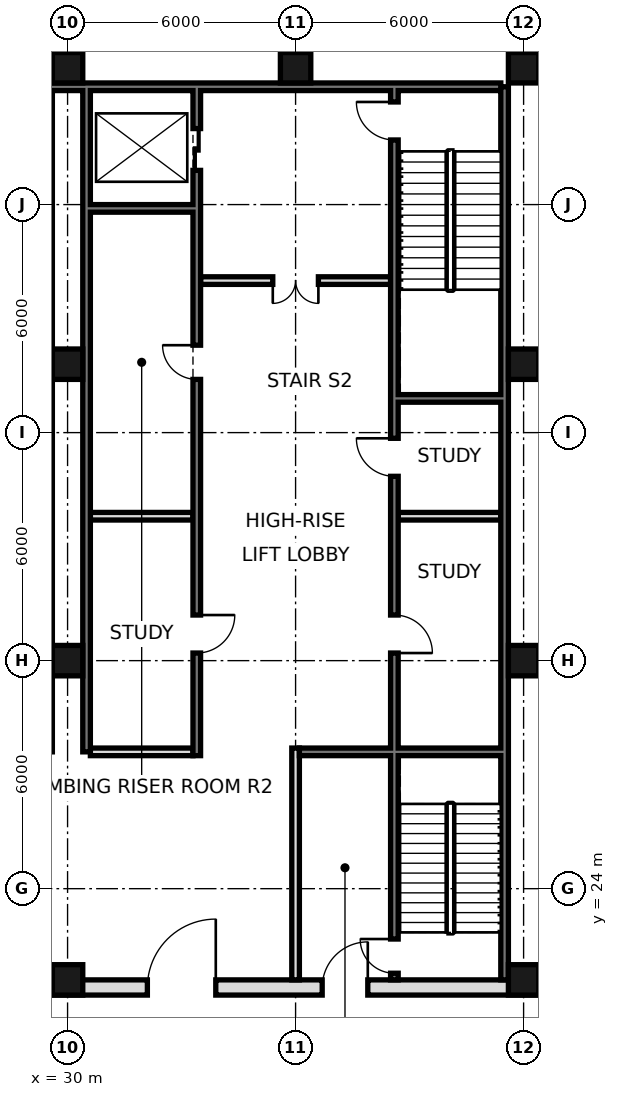
"""IFC4 building model, lengths in metres.
Left out: names, types, materials, properties, quantities, classifications, styles, units other than length and angle.
Written with IfcOpenShell. Run it as: python <this file> out.ifc"""

import sys

from ifc_helpers import new_model, si_unit, direction, frame, frame_2d, origin, origin_2d, place, context, subcontext, project, spatial, rectangle, hollow_rectangle, extrude, element, fill, save


model = new_model("IFC4")
c1 = context("Model", 3, precision=1e-05, world=origin(), true_north=direction((0.0, 1.0)))
c2 = subcontext(c1, "Body", "Model", "MODEL_VIEW")
j1 = project(units=[si_unit("LENGTHUNIT", "METRE"), si_unit("PLANEANGLEUNIT", "RADIAN")], contexts=[c1])
p1 = place(None, origin())
s1 = spatial("IfcSite", under=j1, at=p1, CompositionType="ELEMENT")
p2 = place(p1, origin())
s2 = spatial("IfcBuilding", under=s1, at=p2, CompositionType="ELEMENT")
p3 = place(p2, frame((0.0, 0.0, 34.8)))
s3 = spatial("IfcBuildingStorey", under=s2, at=p3, CompositionType="ELEMENT", Elevation=34.8)
for number, where, z_axis, x_axis in (
    (1, (30.0, 21.6, 0.0), (0.0, 0.0, 1.0), (1.0, 0.0, 0.0)),
    (2, (30.0, 30.0, 0.0), (0.0, 0.0, 1.0), (1.0, 0.0, 0.0)),
    (3, (30.0, 37.8, 0.0), (0.0, 0.0, 1.0), (1.0, 0.0, 0.0)),
    (4, (30.0, 45.6, 0.0), (0.0, 0.0, 1.0), (1.0, 0.0, 0.0)),
    (5, (36.0, 45.6, 0.0), (0.0, 0.0, 1.0), (1.0, 0.0, 0.0)),
    (6, (42.0, 21.6, 0.0), (0.0, 0.0, 1.0), (1.0, 0.0, 0.0)),
    (7, (42.0, 30.0, 0.0), (0.0, 0.0, 1.0), (1.0, 0.0, 0.0)),
    (8, (42.0, 37.8, 0.0), (0.0, 0.0, 1.0), (1.0, 0.0, 0.0)),
    (9, (42.0, 45.6, 0.0), (0.0, 0.0, 1.0), (1.0, 0.0, 0.0)),
):
    element("IfcColumn", number, at=place(p3, frame(where, z_axis=z_axis, x_axis=x_axis)), inside=s3, PredefinedType="COLUMN", context=c2, shape_type="SweptSolid", body=[
        extrude(hollow_rectangle(XDim=0.8, YDim=0.8, WallThickness=0.07, at=origin_2d()), origin(), (0.0, 0.0, 1.0), 4.8),
    ])
p4 = place(p3, frame((41.5, 21.6, 0.0), z_axis=(0.0, 0.0, 1.0), x_axis=(0.0, 1.0, 0.0)))
e10 = element("IfcWall", 10, at=p4, inside=s3, PredefinedType="SOLIDWALL", context=c2, shape_type="SweptSolid", body=[
    extrude(rectangle(XDim=23.5, YDim=0.2, at=frame_2d((11.75, 0.0))), origin(), (0.0, 0.0, 1.0), 4.4),
])
p5 = place(p3, frame((6.6, 45.1, 0.0), z_axis=(0.0, 0.0, 1.0), x_axis=(1.0, 0.0, 0.0)))
e11 = element("IfcWall", 11, at=p5, inside=s3, PredefinedType="SOLIDWALL", context=c2, shape_type="SweptSolid", body=[
    extrude(rectangle(XDim=34.8, YDim=0.2, at=frame_2d((17.4, 0.0))), origin(), (0.0, 0.0, 1.0), 4.4),
])
p6 = place(p3, frame((30.5, 27.6, 0.0), z_axis=(0.0, 0.0, 1.0), x_axis=(0.0, 1.0, 0.0)))
e12 = element("IfcWall", 12, at=p6, inside=s3, PredefinedType="SOLIDWALL", context=c2, shape_type="SweptSolid", body=[
    extrude(rectangle(XDim=17.5, YDim=0.2, at=frame_2d((8.75, 0.0))), origin(), (0.0, 0.0, 1.0), 4.4),
])
p7 = place(p3, frame((5.6, 21.4, 0.0), z_axis=(0.0, 0.0, 1.0), x_axis=(1.0, 0.0, 0.0)))
e13 = element("IfcWall", 13, at=p7, inside=s3, PredefinedType="SOLIDWALL", context=c2, shape_type="SweptSolid", body=[
    extrude(rectangle(XDim=36.8, YDim=0.4, at=frame_2d((18.4, 0.0))), origin(), (0.0, 0.0, 1.0), 4.4),
])
p8 = place(p7, frame((8.5, 0.0, 0.0)))
e14 = element("IfcOpeningElement", 14, at=p8, cuts=e13, PredefinedType="OPENING", context=c2, shape_type="SweptSolid", body=[
    extrude(rectangle(XDim=1.8, YDim=2.1, at=frame_2d((0.9, 1.05))), frame((0.0, 0.21, 0.0), z_axis=(0.0, -1.0, 0.0), x_axis=(1.0, 0.0, 0.0)), (0.0, 0.0, 1.0), 0.42),
])
p9 = place(p7, frame((17.5, 0.0, 0.0)))
e15 = element("IfcOpeningElement", 15, at=p9, cuts=e13, PredefinedType="OPENING", context=c2, shape_type="SweptSolid", body=[
    extrude(rectangle(XDim=1.8, YDim=2.1, at=frame_2d((0.9, 1.05))), frame((0.0, 0.21, 0.0), z_axis=(0.0, -1.0, 0.0), x_axis=(1.0, 0.0, 0.0)), (0.0, 0.0, 1.0), 0.42),
])
p10 = place(p7, frame((26.5, 0.0, 0.0)))
e16 = element("IfcOpeningElement", 16, at=p10, cuts=e13, PredefinedType="OPENING", context=c2, shape_type="SweptSolid", body=[
    extrude(rectangle(XDim=1.8, YDim=2.1, at=frame_2d((0.9, 1.05))), frame((0.0, 0.21, 0.0), z_axis=(0.0, -1.0, 0.0), x_axis=(1.0, 0.0, 0.0)), (0.0, 0.0, 1.0), 0.42),
])
p11 = place(p7, frame((4.5, 0.0, 0.0)))
e17 = element("IfcOpeningElement", 17, at=p11, cuts=e13, PredefinedType="OPENING", context=c2, shape_type="SweptSolid", body=[
    extrude(rectangle(XDim=1.2, YDim=2.1, at=frame_2d((0.6, 1.05))), frame((0.0, 0.21, 0.0), z_axis=(0.0, -1.0, 0.0), x_axis=(1.0, 0.0, 0.0)), (0.0, 0.0, 1.0), 0.42),
])
p12 = place(p7, frame((31.1, 0.0, 0.0)))
e18 = element("IfcOpeningElement", 18, at=p12, cuts=e13, PredefinedType="OPENING", context=c2, shape_type="SweptSolid", body=[
    extrude(rectangle(XDim=1.2, YDim=2.1, at=frame_2d((0.6, 1.05))), frame((0.0, 0.21, 0.0), z_axis=(0.0, -1.0, 0.0), x_axis=(1.0, 0.0, 0.0)), (0.0, 0.0, 1.0), 0.42),
])
p13 = place(p3, frame((33.4, 27.5, 0.0), z_axis=(0.0, 0.0, 1.0), x_axis=(0.0, 1.0, 0.0)))
e19 = element("IfcWall", 19, at=p13, inside=s3, PredefinedType="SOLIDWALL", context=c2, shape_type="SweptSolid", body=[
    extrude(rectangle(XDim=17.5, YDim=0.2, at=frame_2d((8.75, 0.0))), origin(), (0.0, 0.0, 1.0), 4.4),
])
p14 = place(p13, frame((15.4, 0.0, 0.0)))
e20 = element("IfcOpeningElement", 20, at=p14, cuts=e19, PredefinedType="OPENING", context=c2, shape_type="SweptSolid", body=[
    extrude(rectangle(XDim=1.1, YDim=2.1, at=frame_2d((0.55, 1.05))), frame((0.0, 0.11, 0.0), z_axis=(0.0, -1.0, 0.0), x_axis=(1.0, 0.0, 0.0)), (0.0, 0.0, 1.0), 0.22),
])
p15 = place(p13, frame((2.7, 0.0, 0.0)))
e21 = element("IfcOpeningElement", 21, at=p15, cuts=e19, PredefinedType="OPENING", context=c2, shape_type="SweptSolid", body=[
    extrude(rectangle(XDim=1.0, YDim=2.1, at=frame_2d((0.5, 1.05))), frame((0.0, 0.11, 0.0), z_axis=(0.0, -1.0, 0.0), x_axis=(1.0, 0.0, 0.0)), (0.0, 0.0, 1.0), 0.22),
])
p16 = place(p13, frame((9.9, 0.0, 0.0)))
e22 = element("IfcOpeningElement", 22, at=p16, cuts=e19, PredefinedType="OPENING", context=c2, shape_type="SweptSolid", body=[
    extrude(rectangle(XDim=0.9, YDim=2.1, at=frame_2d((0.45, 1.05))), frame((0.0, 0.11, 0.0), z_axis=(0.0, -1.0, 0.0), x_axis=(1.0, 0.0, 0.0)), (0.0, 0.0, 1.0), 0.22),
])
p17 = place(p3, frame((36.0, 21.6, 0.0), z_axis=(0.0, 0.0, 1.0), x_axis=(0.0, 1.0, 0.0)))
e23 = element("IfcWall", 23, at=p17, inside=s3, PredefinedType="PARTITIONING", context=c2, shape_type="SweptSolid", body=[
    extrude(rectangle(XDim=6.1, YDim=0.2, at=frame_2d((3.05, 0.0))), origin(), (0.0, 0.0, 1.0), 4.4),
])
p18 = place(p3, frame((38.6, 21.6, 0.0), z_axis=(0.0, 0.0, 1.0), x_axis=(0.0, 1.0, 0.0)))
e24 = element("IfcWall", 24, at=p18, inside=s3, PredefinedType="SOLIDWALL", context=c2, shape_type="SweptSolid", body=[
    extrude(rectangle(XDim=23.4, YDim=0.2, at=frame_2d((11.7, 0.0))), origin(), (0.0, 0.0, 1.0), 4.4),
])
p19 = place(p18, frame((8.6, 0.0, 0.0)))
e25 = element("IfcOpeningElement", 25, at=p19, cuts=e24, PredefinedType="OPENING", context=c2, shape_type="SweptSolid", body=[
    extrude(rectangle(XDim=1.0, YDim=2.1, at=frame_2d((0.5, 1.05))), frame((0.0, 0.11, 0.0), z_axis=(0.0, -1.0, 0.0), x_axis=(1.0, 0.0, 0.0)), (0.0, 0.0, 1.0), 0.22),
])
p20 = place(p18, frame((13.25, 0.0, 0.0)))
e26 = element("IfcOpeningElement", 26, at=p20, cuts=e24, PredefinedType="OPENING", context=c2, shape_type="SweptSolid", body=[
    extrude(rectangle(XDim=1.0, YDim=2.1, at=frame_2d((0.5, 1.05))), frame((0.0, 0.11, 0.0), z_axis=(0.0, -1.0, 0.0), x_axis=(1.0, 0.0, 0.0)), (0.0, 0.0, 1.0), 0.22),
])
p21 = place(p18, frame((22.1, 0.0, 0.0)))
e27 = element("IfcOpeningElement", 27, at=p21, cuts=e24, PredefinedType="OPENING", context=c2, shape_type="SweptSolid", body=[
    extrude(rectangle(XDim=1.0, YDim=2.1, at=frame_2d((0.5, 1.05))), frame((0.0, 0.11, 0.0), z_axis=(0.0, -1.0, 0.0), x_axis=(1.0, 0.0, 0.0)), (0.0, 0.0, 1.0), 0.22),
])
p22 = place(p18, frame((0.175, 0.0, 0.0)))
e28 = element("IfcOpeningElement", 28, at=p22, cuts=e24, PredefinedType="OPENING", context=c2, shape_type="SweptSolid", body=[
    extrude(rectangle(XDim=0.9, YDim=2.1, at=frame_2d((0.45, 1.05))), frame((0.0, 0.11, 0.0), z_axis=(0.0, -1.0, 0.0), x_axis=(1.0, 0.0, 0.0)), (0.0, 0.0, 1.0), 0.22),
])
p23 = place(p3, frame((30.6, 27.6, 0.0), z_axis=(0.0, 0.0, 1.0), x_axis=(1.0, 0.0, 0.0)))
e29 = element("IfcWall", 29, at=p23, inside=s3, PredefinedType="PARTITIONING", context=c2, shape_type="SweptSolid", body=[
    extrude(rectangle(XDim=2.7, YDim=0.2, at=frame_2d((1.35, 0.0))), origin(), (0.0, 0.0, 1.0), 4.4),
])
p24 = place(p3, frame((36.1, 27.6, 0.0), z_axis=(0.0, 0.0, 1.0), x_axis=(1.0, 0.0, 0.0)))
e30 = element("IfcWall", 30, at=p24, inside=s3, PredefinedType="SOLIDWALL", context=c2, shape_type="SweptSolid", body=[
    extrude(rectangle(XDim=5.3, YDim=0.2, at=frame_2d((2.65, 0.0))), origin(), (0.0, 0.0, 1.0), 4.4),
])
p25 = place(p3, frame((30.6, 33.8, 0.0), z_axis=(0.0, 0.0, 1.0), x_axis=(1.0, 0.0, 0.0)))
e31 = element("IfcWall", 31, at=p25, inside=s3, PredefinedType="SOLIDWALL", context=c2, shape_type="SweptSolid", body=[
    extrude(rectangle(XDim=2.7, YDim=0.2, at=frame_2d((1.35, 0.0))), origin(), (0.0, 0.0, 1.0), 4.4),
])
p26 = place(p3, frame((38.7, 33.8, 0.0), z_axis=(0.0, 0.0, 1.0), x_axis=(1.0, 0.0, 0.0)))
e32 = element("IfcWall", 32, at=p26, inside=s3, PredefinedType="PARTITIONING", context=c2, shape_type="SweptSolid", body=[
    extrude(rectangle(XDim=2.7, YDim=0.2, at=frame_2d((1.35, 0.0))), origin(), (0.0, 0.0, 1.0), 4.4),
])
p27 = place(p3, frame((38.7, 36.9, 0.0), z_axis=(0.0, 0.0, 1.0), x_axis=(1.0, 0.0, 0.0)))
e33 = element("IfcWall", 33, at=p27, inside=s3, PredefinedType="SOLIDWALL", context=c2, shape_type="SweptSolid", body=[
    extrude(rectangle(XDim=2.7, YDim=0.2, at=frame_2d((1.35, 0.0))), origin(), (0.0, 0.0, 1.0), 4.4),
])
p28 = place(p3, frame((33.5, 40.0, 0.0), z_axis=(0.0, 0.0, 1.0), x_axis=(1.0, 0.0, 0.0)))
e34 = element("IfcWall", 34, at=p28, inside=s3, PredefinedType="PARTITIONING", context=c2, shape_type="SweptSolid", body=[
    extrude(rectangle(XDim=5.0, YDim=0.2, at=frame_2d((2.5, 0.0))), origin(), (0.0, 0.0, 1.0), 4.4),
])
p29 = place(p28, frame((1.9, 0.0, 0.0)))
e35 = element("IfcOpeningElement", 35, at=p29, cuts=e34, PredefinedType="OPENING", context=c2, shape_type="SweptSolid", body=[
    extrude(rectangle(XDim=1.2, YDim=2.1, at=frame_2d((0.6, 1.05))), frame((0.0, 0.11, 0.0), z_axis=(0.0, -1.0, 0.0), x_axis=(1.0, 0.0, 0.0)), (0.0, 0.0, 1.0), 0.22),
])
p30 = place(p3, frame((30.6, 41.9, 0.0), z_axis=(0.0, 0.0, 1.0), x_axis=(1.0, 0.0, 0.0)))
e36 = element("IfcWall", 36, at=p30, inside=s3, PredefinedType="SOLIDWALL", context=c2, shape_type="SweptSolid", body=[
    extrude(rectangle(XDim=2.7, YDim=0.2, at=frame_2d((1.35, 0.0))), origin(), (0.0, 0.0, 1.0), 4.4),
])
p31 = place(p10, frame((1.8, 0.0, 0.0), z_axis=(0.0, 0.0, 1.0), x_axis=(-1.0, 0.0, 0.0)))
e37 = element("IfcDoor", 37, at=p31, inside=s3, OperationType="SINGLE_SWING_LEFT", PredefinedType="DOOR", context=c2, shape_type="SweptSolid", body=[
    extrude(rectangle(XDim=1.8, YDim=2.1, at=frame_2d((0.9, 1.05))), frame((0.0, 0.025, 0.0), z_axis=(0.0, -1.0, 0.0), x_axis=(1.0, 0.0, 0.0)), (0.0, 0.0, 1.0), 0.05),
])
fill(e16, e37)
p32 = place(p12, frame((1.2, 0.0, 0.0), z_axis=(0.0, 0.0, 1.0), x_axis=(-1.0, 0.0, 0.0)))
e38 = element("IfcDoor", 38, at=p32, inside=s3, OperationType="SINGLE_SWING_LEFT", PredefinedType="DOOR", context=c2, shape_type="SweptSolid", body=[
    extrude(rectangle(XDim=1.2, YDim=2.1, at=frame_2d((0.6, 1.05))), frame((0.0, 0.025, 0.0), z_axis=(0.0, -1.0, 0.0), x_axis=(1.0, 0.0, 0.0)), (0.0, 0.0, 1.0), 0.05),
])
fill(e18, e38)
p33 = place(p29, frame((1.2, 0.0, 0.0), z_axis=(0.0, 0.0, 1.0), x_axis=(-1.0, 0.0, 0.0)))
e39 = element("IfcDoor", 39, at=p33, inside=s3, OperationType="DOUBLE_DOOR_SINGLE_SWING", PredefinedType="DOOR", context=c2, shape_type="SweptSolid", body=[
    extrude(rectangle(XDim=1.2, YDim=2.1, at=frame_2d((0.6, 1.05))), frame((0.0, 0.025, 0.0), z_axis=(0.0, -1.0, 0.0), x_axis=(1.0, 0.0, 0.0)), (0.0, 0.0, 1.0), 0.05),
])
fill(e35, e39)
p34 = place(p14, origin())
e40 = element("IfcDoor", 40, at=p34, inside=s3, OperationType="DOUBLE_DOOR_SLIDING", PredefinedType="DOOR", context=c2, shape_type="SweptSolid", body=[
    extrude(rectangle(XDim=1.1, YDim=2.1, at=frame_2d((0.55, 1.05))), frame((0.0, 0.025, 0.0), z_axis=(0.0, -1.0, 0.0), x_axis=(1.0, 0.0, 0.0)), (0.0, 0.0, 1.0), 0.05),
])
fill(e20, e40)
p35 = place(p19, frame((1.0, 0.0, 0.0), z_axis=(0.0, 0.0, 1.0), x_axis=(-1.0, 0.0, 0.0)))
e41 = element("IfcDoor", 41, at=p35, inside=s3, OperationType="SINGLE_SWING_RIGHT", PredefinedType="DOOR", context=c2, shape_type="SweptSolid", body=[
    extrude(rectangle(XDim=1.0, YDim=2.1, at=frame_2d((0.5, 1.05))), frame((0.0, 0.025, 0.0), z_axis=(0.0, -1.0, 0.0), x_axis=(1.0, 0.0, 0.0)), (0.0, 0.0, 1.0), 0.05),
])
fill(e25, e41)
p36 = place(p20, frame((1.0, 0.0, 0.0), z_axis=(0.0, 0.0, 1.0), x_axis=(-1.0, 0.0, 0.0)))
e42 = element("IfcDoor", 42, at=p36, inside=s3, OperationType="SINGLE_SWING_LEFT", PredefinedType="DOOR", context=c2, shape_type="SweptSolid", body=[
    extrude(rectangle(XDim=1.0, YDim=2.1, at=frame_2d((0.5, 1.05))), frame((0.0, 0.025, 0.0), z_axis=(0.0, -1.0, 0.0), x_axis=(1.0, 0.0, 0.0)), (0.0, 0.0, 1.0), 0.05),
])
fill(e26, e42)
p37 = place(p15, origin())
e43 = element("IfcDoor", 43, at=p37, inside=s3, OperationType="SINGLE_SWING_RIGHT", PredefinedType="DOOR", context=c2, shape_type="SweptSolid", body=[
    extrude(rectangle(XDim=1.0, YDim=2.1, at=frame_2d((0.5, 1.05))), frame((0.0, 0.025, 0.0), z_axis=(0.0, -1.0, 0.0), x_axis=(1.0, 0.0, 0.0)), (0.0, 0.0, 1.0), 0.05),
])
fill(e21, e43)
p38 = place(p21, frame((1.0, 0.0, 0.0), z_axis=(0.0, 0.0, 1.0), x_axis=(-1.0, 0.0, 0.0)))
e44 = element("IfcDoor", 44, at=p38, inside=s3, OperationType="SINGLE_SWING_LEFT", PredefinedType="DOOR", context=c2, shape_type="SweptSolid", body=[
    extrude(rectangle(XDim=1.0, YDim=2.1, at=frame_2d((0.5, 1.05))), frame((0.0, 0.025, 0.0), z_axis=(0.0, -1.0, 0.0), x_axis=(1.0, 0.0, 0.0)), (0.0, 0.0, 1.0), 0.05),
])
fill(e27, e44)
p39 = place(p22, frame((0.9, 0.0, 0.0), z_axis=(0.0, 0.0, 1.0), x_axis=(-1.0, 0.0, 0.0)))
e45 = element("IfcDoor", 45, at=p39, inside=s3, OperationType="SINGLE_SWING_LEFT", PredefinedType="DOOR", context=c2, shape_type="SweptSolid", body=[
    extrude(rectangle(XDim=0.9, YDim=2.1, at=frame_2d((0.45, 1.05))), frame((0.0, 0.025, 0.0), z_axis=(0.0, -1.0, 0.0), x_axis=(1.0, 0.0, 0.0)), (0.0, 0.0, 1.0), 0.05),
])
fill(e28, e45)
p40 = place(p16, frame((0.9, 0.0, 0.0), z_axis=(0.0, 0.0, 1.0), x_axis=(-1.0, 0.0, 0.0)))
e46 = element("IfcDoor", 46, at=p40, inside=s3, OperationType="SINGLE_SWING_LEFT", PredefinedType="DOOR", context=c2, shape_type="SweptSolid", body=[
    extrude(rectangle(XDim=0.9, YDim=2.1, at=frame_2d((0.45, 1.05))), frame((0.0, 0.025, 0.0), z_axis=(0.0, -1.0, 0.0), x_axis=(1.0, 0.0, 0.0)), (0.0, 0.0, 1.0), 0.05),
])
fill(e22, e46)
save(model, sys.argv[1])
